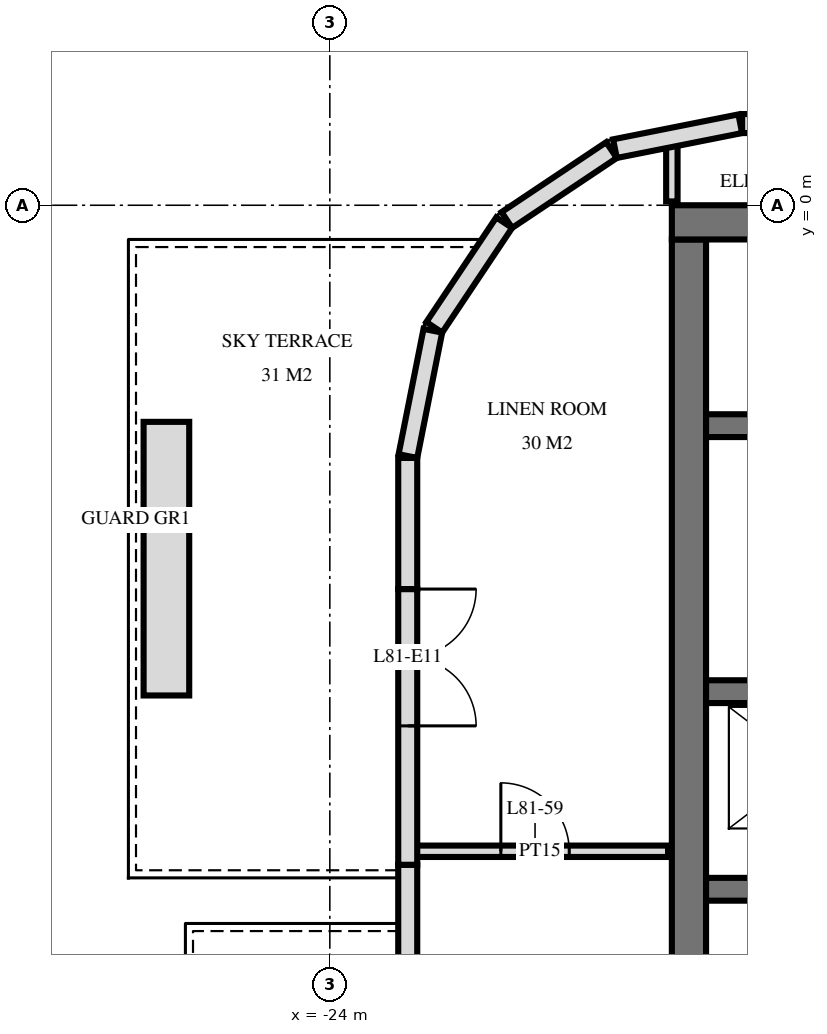
"""IFC4 building model, lengths in metres.
Left out: names, types, materials, properties, quantities, classifications, styles, units other than length and angle.
Written with IfcOpenShell. Run it as: python <this file> out.ifc"""

import sys

from ifc_helpers import new_model, si_unit, direction, frame, frame_2d, origin, place, context, subcontext, project, spatial, rectangle, extrude, element, fill, save


model = new_model("IFC4")
c1 = context("Model", 3, precision=1e-05, world=origin(), true_north=direction((0.0, 1.0)))
c2 = subcontext(c1, "Body", "Model", "MODEL_VIEW")
j1 = project(units=[si_unit("LENGTHUNIT", "METRE"), si_unit("PLANEANGLEUNIT", "RADIAN")], contexts=[c1])
p1 = place(None, origin())
s1 = spatial("IfcSite", under=j1, at=p1, CompositionType="ELEMENT")
p2 = place(p1, origin())
s2 = spatial("IfcBuilding", under=s1, at=p2, CompositionType="ELEMENT")
p3 = place(p2, frame((0.0, 0.0, 305.1)))
s3 = spatial("IfcBuildingStorey", under=s2, at=p3, CompositionType="ELEMENT", Elevation=305.1)
p4 = place(p3, frame((-19.5, -0.225, 0.0), z_axis=(0.0, 0.0, 1.0), x_axis=(1.0, 0.0, 0.0)))
e1 = element("IfcWall", 1, at=p4, inside=s3, PredefinedType="SHEAR", context=c2, shape_type="SweptSolid", body=[
    extrude(rectangle(XDim=9.5, YDim=0.45, at=frame_2d((4.75, 0.0))), origin(), (0.0, 0.0, 1.0), 3.5),
])
p5 = place(p3, frame((-19.275, -14.55, 0.0), z_axis=(0.0, 0.0, 1.0), x_axis=(0.0, 1.0, 0.0)))
e2 = element("IfcWall", 2, at=p5, inside=s3, PredefinedType="SHEAR", context=c2, shape_type="SweptSolid", body=[
    extrude(rectangle(XDim=14.1, YDim=0.45, at=frame_2d((7.05, 0.0))), origin(), (0.0, 0.0, 1.0), 3.5),
])
p6 = place(p3, frame((-19.05, -2.9, 0.0), z_axis=(0.0, 0.0, 1.0), x_axis=(1.0, 0.0, 0.0)))
e3 = element("IfcWall", 3, at=p6, inside=s3, PredefinedType="SHEAR", context=c2, shape_type="SweptSolid", body=[
    extrude(rectangle(XDim=8.7, YDim=0.3, at=frame_2d((4.35, 0.0))), origin(), (0.0, 0.0, 1.0), 3.5),
])
p7 = place(p6, frame((6.8, 0.0, 0.0)))
e4 = element("IfcOpeningElement", 4, at=p7, cuts=e3, PredefinedType="OPENING", context=c2, shape_type="SweptSolid", body=[
    extrude(rectangle(XDim=1.1, YDim=2.1, at=frame_2d((0.55, 1.05))), frame((0.0, 0.16, 0.0), z_axis=(0.0, -1.0, 0.0), x_axis=(1.0, 0.0, 0.0)), (0.0, 0.0, 1.0), 0.32),
])
p8 = place(p6, frame((3.8, 0.0, 0.0)))
e5 = element("IfcOpeningElement", 5, at=p8, cuts=e3, PredefinedType="OPENING", context=c2, shape_type="SweptSolid", body=[
    extrude(rectangle(XDim=1.1, YDim=2.1, at=frame_2d((0.55, 1.05))), frame((0.0, 0.16, 0.0), z_axis=(0.0, -1.0, 0.0), x_axis=(1.0, 0.0, 0.0)), (0.0, 0.0, 1.0), 0.32),
])
p9 = place(p6, frame((0.9, 0.0, 0.0)))
e6 = element("IfcOpeningElement", 6, at=p9, cuts=e3, PredefinedType="OPENING", context=c2, shape_type="SweptSolid", body=[
    extrude(rectangle(XDim=0.9, YDim=2.1, at=frame_2d((0.45, 1.05))), frame((0.0, 0.16, 0.0), z_axis=(0.0, -1.0, 0.0), x_axis=(1.0, 0.0, 0.0)), (0.0, 0.0, 1.0), 0.32),
])
p10 = place(p3, frame((-19.05, -6.4, 0.0), z_axis=(0.0, 0.0, 1.0), x_axis=(1.0, 0.0, 0.0)))
e7 = element("IfcWall", 7, at=p10, inside=s3, PredefinedType="SHEAR", context=c2, shape_type="SweptSolid", body=[
    extrude(rectangle(XDim=8.7, YDim=0.3, at=frame_2d((4.35, 0.0))), origin(), (0.0, 0.0, 1.0), 3.5),
])
p11 = place(p10, frame((0.8, 0.0, 0.0)))
e8 = element("IfcOpeningElement", 8, at=p11, cuts=e7, PredefinedType="OPENING", context=c2, shape_type="SweptSolid", body=[
    extrude(rectangle(XDim=1.1, YDim=2.1, at=frame_2d((0.55, 1.05))), frame((0.0, 0.16, 0.0), z_axis=(0.0, -1.0, 0.0), x_axis=(1.0, 0.0, 0.0)), (0.0, 0.0, 1.0), 0.32),
])
p12 = place(p3, frame((-19.05, -9.0, 0.0), z_axis=(0.0, 0.0, 1.0), x_axis=(1.0, 0.0, 0.0)))
e9 = element("IfcWall", 9, at=p12, inside=s3, PredefinedType="SHEAR", context=c2, shape_type="SweptSolid", body=[
    extrude(rectangle(XDim=8.7, YDim=0.3, at=frame_2d((4.35, 0.0))), origin(), (0.0, 0.0, 1.0), 3.5),
])
p13 = place(p12, frame((3.8, 0.0, 0.0)))
e10 = element("IfcOpeningElement", 10, at=p13, cuts=e9, PredefinedType="OPENING", context=c2, shape_type="SweptSolid", body=[
    extrude(rectangle(XDim=1.1, YDim=2.1, at=frame_2d((0.55, 1.05))), frame((0.0, 0.16, 0.0), z_axis=(0.0, -1.0, 0.0), x_axis=(1.0, 0.0, 0.0)), (0.0, 0.0, 1.0), 0.32),
])
p14 = place(p3, frame((18.575, 1.075, 0.0), z_axis=(0.0, 0.0, 1.0), x_axis=(-1.0, 0.0, 0.0)))
e11 = element("IfcWall", 11, at=p14, inside=s3, PredefinedType="SOLIDWALL", context=c2, shape_type="SweptSolid", body=[
    extrude(rectangle(XDim=37.151, YDim=0.25, at=frame_2d((18.575, 0.0))), origin(), (0.0, 0.0, 1.0), 3.2),
])
p15 = place(p14, frame((15.275, 0.0, 0.9)))
e12 = element("IfcOpeningElement", 12, at=p15, cuts=e11, PredefinedType="OPENING", context=c2, shape_type="SweptSolid", body=[
    extrude(rectangle(XDim=2.4, YDim=1.5, at=frame_2d((1.2, 0.75))), frame((0.0, 0.135, 0.0), z_axis=(0.0, -1.0, 0.0), x_axis=(1.0, 0.0, 0.0)), (0.0, 0.0, 1.0), 0.27),
])
p16 = place(p14, frame((19.625, 0.0, 0.9)))
e13 = element("IfcOpeningElement", 13, at=p16, cuts=e11, PredefinedType="OPENING", context=c2, shape_type="SweptSolid", body=[
    extrude(rectangle(XDim=2.4, YDim=1.5, at=frame_2d((1.2, 0.75))), frame((0.0, 0.135, 0.0), z_axis=(0.0, -1.0, 0.0), x_axis=(1.0, 0.0, 0.0)), (0.0, 0.0, 1.0), 0.27),
])
p17 = place(p14, frame((24.275, 0.0, 0.9)))
e14 = element("IfcOpeningElement", 14, at=p17, cuts=e11, PredefinedType="OPENING", context=c2, shape_type="SweptSolid", body=[
    extrude(rectangle(XDim=2.4, YDim=1.5, at=frame_2d((1.2, 0.75))), frame((0.0, 0.135, 0.0), z_axis=(0.0, -1.0, 0.0), x_axis=(1.0, 0.0, 0.0)), (0.0, 0.0, 1.0), 0.27),
])
p18 = place(p3, frame((-18.6, 1.073, 0.0), z_axis=(0.0, 0.0, 1.0), x_axis=(-0.980797896849, -0.195026884138, 0.0)))
e15 = element("IfcWall", 15, at=p18, inside=s3, PredefinedType="SOLIDWALL", context=c2, shape_type="SweptSolid", body=[
    extrude(rectangle(XDim=1.681, YDim=0.25, at=frame_2d((0.841, 0.0))), origin(), (0.0, 0.0, 1.0), 3.2),
])
for number, where, z_axis, x_axis in (
    (16, (-20.294, 0.726, 0.0), (0.0, 0.0, 1.0), (-0.831, -0.556, 0.0)),
    (17, (-21.706, -0.229, 0.0), (0.0, 0.0, 1.0), (-0.556, -0.831, 0.0)),
):
    element("IfcWall", number, at=place(p3, frame(where, z_axis=z_axis, x_axis=x_axis)), inside=s3, PredefinedType="SOLIDWALL", context=c2, shape_type="SweptSolid", body=[
        extrude(rectangle(XDim=1.656, YDim=0.25, at=frame_2d((0.828, 0.0))), origin(), (0.0, 0.0, 1.0), 3.2),
    ])
p19 = place(p3, frame((-22.645, -1.651, 0.0), z_axis=(0.0, 0.0, 1.0), x_axis=(-0.19513878023, -0.980775640221, 0.0)))
e18 = element("IfcWall", 18, at=p19, inside=s3, PredefinedType="SOLIDWALL", context=c2, shape_type="SweptSolid", body=[
    extrude(rectangle(XDim=1.681, YDim=0.25, at=frame_2d((0.841, 0.0))), origin(), (0.0, 0.0, 1.0), 3.2),
])
p20 = place(p3, frame((-22.975, -3.325, 0.0), z_axis=(0.0, 0.0, 1.0), x_axis=(0.0, -1.0, 0.0)))
e19 = element("IfcWall", 19, at=p20, inside=s3, PredefinedType="SOLIDWALL", context=c2, shape_type="SweptSolid", body=[
    extrude(rectangle(XDim=1.725, YDim=0.25, at=frame_2d((0.863, 0.0))), origin(), (0.0, 0.0, 1.0), 3.2),
])
p21 = place(p3, frame((-26.15, -6.45, 0.0), z_axis=(0.0, 0.0, 1.0), x_axis=(0.0, 1.0, 0.0)))
e20 = element("IfcWall", 20, at=p21, inside=s3, PredefinedType="USERDEFINED", context=c2, shape_type="SweptSolid", body=[
    extrude(rectangle(XDim=3.6, YDim=0.6, at=frame_2d((1.8, 0.0))), origin(), (0.0, 0.0, 1.0), 0.65),
])
p22 = place(p3, frame((-19.5, 0.05, 0.0), z_axis=(0.0, 0.0, 1.0), x_axis=(0.0, 1.0, 0.0)))
e21 = element("IfcWall", 21, at=p22, inside=s3, PredefinedType="PARTITIONING", context=c2, shape_type="SweptSolid", body=[
    extrude(rectangle(XDim=0.787, YDim=0.15, at=frame_2d((0.394, 0.0))), origin(), (0.0, 0.0, 1.0), 3.22),
])
p23 = place(p3, frame((-22.92, -8.5, 0.0), z_axis=(0.0, 0.0, 1.0), x_axis=(1.0, 0.0, 0.0)))
e22 = element("IfcWall", 22, at=p23, inside=s3, PredefinedType="PARTITIONING", context=c2, shape_type="SweptSolid", body=[
    extrude(rectangle(XDim=3.37, YDim=0.15, at=frame_2d((1.685, 0.0))), origin(), (0.0, 0.0, 1.0), 3.22),
])
p24 = place(p23, frame((1.17, 0.0, 0.0)))
e23 = element("IfcOpeningElement", 23, at=p24, cuts=e22, PredefinedType="OPENING", context=c2, shape_type="SweptSolid", body=[
    extrude(rectangle(XDim=0.9, YDim=2.1, at=frame_2d((0.45, 1.05))), frame((0.0, 0.085, 0.0), z_axis=(0.0, -1.0, 0.0), x_axis=(1.0, 0.0, 0.0)), (0.0, 0.0, 1.0), 0.17),
])
p25 = place(p3, frame((-22.975, -5.05, 0.0), z_axis=(0.0, 0.0, 1.0), x_axis=(0.0, -1.0, 0.0)))
e24 = element("IfcWall", 24, at=p25, inside=s3, PredefinedType="SOLIDWALL", context=c2, shape_type="SweptSolid", body=[
    extrude(rectangle(XDim=3.628, YDim=0.25, at=frame_2d((1.814, 0.0))), origin(), (0.0, 0.0, 1.0), 2.837),
])
p26 = place(p25, origin())
e25 = element("IfcOpeningElement", 25, at=p26, cuts=e24, PredefinedType="OPENING", context=c2, shape_type="SweptSolid", body=[
    extrude(rectangle(XDim=1.8, YDim=2.4, at=frame_2d((0.9, 1.2))), frame((0.0, 0.135, 0.0), z_axis=(0.0, -1.0, 0.0), x_axis=(1.0, 0.0, 0.0)), (0.0, 0.0, 1.0), 0.27),
])
p27 = place(p3, frame((-22.975, -8.678, 0.0), z_axis=(0.0, 0.0, 1.0), x_axis=(0.0, -1.0, 0.0)))
e26 = element("IfcWall", 26, at=p27, inside=s3, PredefinedType="SOLIDWALL", context=c2, shape_type="SweptSolid", body=[
    extrude(rectangle(XDim=20.598, YDim=0.25, at=frame_2d((10.299, 0.0))), origin(), (0.0, 0.0, 1.0), 3.2),
])
p28 = place(p27, frame((2.622, 0.0, 0.0)))
e27 = element("IfcOpeningElement", 27, at=p28, cuts=e26, PredefinedType="OPENING", context=c2, shape_type="SweptSolid", body=[
    extrude(rectangle(XDim=1.8, YDim=2.4, at=frame_2d((0.9, 1.2))), frame((0.0, 0.135, 0.0), z_axis=(0.0, -1.0, 0.0), x_axis=(1.0, 0.0, 0.0)), (0.0, 0.0, 1.0), 0.27),
])
p29 = place(p27, frame((6.922, 0.0, 0.9)))
e28 = element("IfcOpeningElement", 28, at=p29, cuts=e26, PredefinedType="OPENING", context=c2, shape_type="SweptSolid", body=[
    extrude(rectangle(XDim=1.2, YDim=1.5, at=frame_2d((0.6, 0.75))), frame((0.0, 0.135, 0.0), z_axis=(0.0, -1.0, 0.0), x_axis=(1.0, 0.0, 0.0)), (0.0, 0.0, 1.0), 0.27),
])
p30 = place(p27, frame((9.922, 0.0, 0.0)))
e29 = element("IfcOpeningElement", 29, at=p30, cuts=e26, PredefinedType="OPENING", context=c2, shape_type="SweptSolid", body=[
    extrude(rectangle(XDim=1.8, YDim=2.4, at=frame_2d((0.9, 1.2))), frame((0.0, 0.135, 0.0), z_axis=(0.0, -1.0, 0.0), x_axis=(1.0, 0.0, 0.0)), (0.0, 0.0, 1.0), 0.27),
])
p31 = place(p27, frame((15.722, 0.0, 0.0)))
e30 = element("IfcOpeningElement", 30, at=p31, cuts=e26, PredefinedType="OPENING", context=c2, shape_type="SweptSolid", body=[
    extrude(rectangle(XDim=1.8, YDim=2.4, at=frame_2d((0.9, 1.2))), frame((0.0, 0.135, 0.0), z_axis=(0.0, -1.0, 0.0), x_axis=(1.0, 0.0, 0.0)), (0.0, 0.0, 1.0), 0.27),
])
p32 = place(p27, frame((18.472, 0.0, 0.9)))
e31 = element("IfcOpeningElement", 31, at=p32, cuts=e26, PredefinedType="OPENING", context=c2, shape_type="SweptSolid", body=[
    extrude(rectangle(XDim=1.8, YDim=1.5, at=frame_2d((0.9, 0.75))), frame((0.0, 0.135, 0.0), z_axis=(0.0, -1.0, 0.0), x_axis=(1.0, 0.0, 0.0)), (0.0, 0.0, 1.0), 0.27),
])
p33 = place(p26, origin())
e32 = element("IfcDoor", 32, at=p33, inside=s3, OperationType="DOUBLE_DOOR_SINGLE_SWING", PredefinedType="DOOR", context=c2, shape_type="SweptSolid", body=[
    extrude(rectangle(XDim=1.8, YDim=2.4, at=frame_2d((0.9, 1.2))), frame((0.0, 0.025, 0.0), z_axis=(0.0, -1.0, 0.0), x_axis=(1.0, 0.0, 0.0)), (0.0, 0.0, 1.0), 0.05),
])
fill(e25, e32)
p34 = place(p24, origin())
e33 = element("IfcDoor", 33, at=p34, inside=s3, OperationType="SINGLE_SWING_RIGHT", PredefinedType="DOOR", context=c2, shape_type="SweptSolid", body=[
    extrude(rectangle(XDim=0.9, YDim=2.1, at=frame_2d((0.45, 1.05))), frame((0.0, 0.025, 0.0), z_axis=(0.0, -1.0, 0.0), x_axis=(1.0, 0.0, 0.0)), (0.0, 0.0, 1.0), 0.05),
])
fill(e23, e33)
save(model, sys.argv[1])
